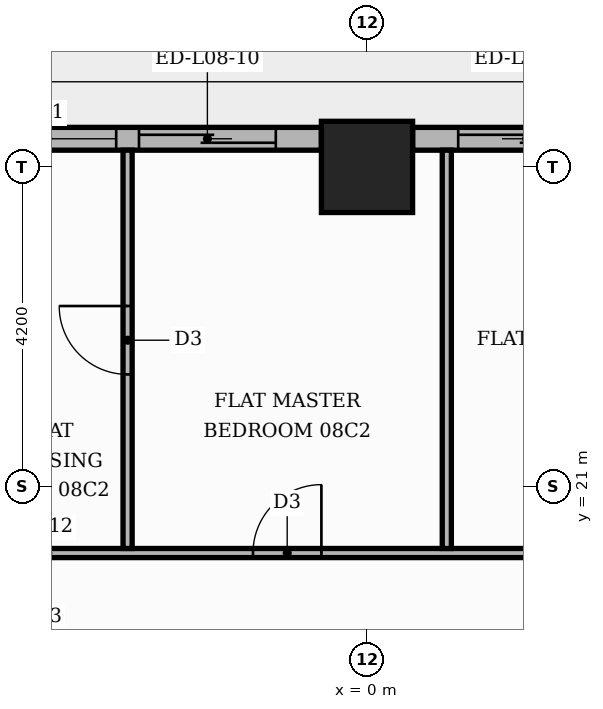
"""IFC4 building model, lengths in metres.
Left out: names, types, materials, properties, quantities, classifications, styles, units other than length and angle.
Written with IfcOpenShell. Run it as: python <this file> out.ifc"""

import sys

from ifc_helpers import new_model, si_unit, direction, frame, frame_2d, origin, origin_2d, place, context, subcontext, project, spatial, rectangle, extrude, element, fill, save


model = new_model("IFC4")
c1 = context("Model", 3, precision=1e-05, world=origin(), true_north=direction((0.0, 1.0)))
c2 = subcontext(c1, "Body", "Model", "MODEL_VIEW")
j1 = project(units=[si_unit("LENGTHUNIT", "METRE"), si_unit("PLANEANGLEUNIT", "RADIAN")], contexts=[c1])
p1 = place(None, origin())
s1 = spatial("IfcSite", under=j1, at=p1, CompositionType="ELEMENT")
p2 = place(p1, origin())
s2 = spatial("IfcBuilding", under=s1, at=p2, CompositionType="ELEMENT")
p3 = place(p2, frame((0.0, 0.0, 38.7)))
s3 = spatial("IfcBuildingStorey", under=s2, at=p3, CompositionType="ELEMENT", Elevation=38.7)
p4 = place(p3, frame((0.0, 25.2, 0.0), z_axis=(0.0, 0.0, 1.0), x_axis=(1.0, 0.0, 0.0)))
e1 = element("IfcColumn", 1, at=p4, inside=s3, PredefinedType="COLUMN", context=c2, shape_type="SweptSolid", body=[
    extrude(rectangle(XDim=1.2, YDim=1.2, at=origin_2d()), origin(), (0.0, 0.0, 1.0), 3.9),
])
p5 = place(p3, frame((7.8, 25.57, 0.0), z_axis=(0.0, 0.0, 1.0), x_axis=(-1.0, 0.0, 0.0)))
e2 = element("IfcWall", 2, at=p5, inside=s3, PredefinedType="STANDARD", context=c2, shape_type="SweptSolid", body=[
    extrude(rectangle(XDim=7.2, YDim=0.3, at=frame_2d((3.6, 0.0))), origin(), (0.0, 0.0, 1.0), 3.48),
])
p6 = place(p5, frame((0.6, 0.0, 0.9)))
e3 = element("IfcOpeningElement", 3, at=p6, cuts=e2, PredefinedType="OPENING", context=c2, shape_type="SweptSolid", body=[
    extrude(rectangle(XDim=1.8, YDim=2.1, at=frame_2d((0.9, 1.05))), frame((0.0, 0.16, 0.0), z_axis=(0.0, -1.0, 0.0), x_axis=(1.0, 0.0, 0.0)), (0.0, 0.0, 1.0), 0.32),
])
p7 = place(p5, frame((2.7, 0.0, 0.9)))
e4 = element("IfcOpeningElement", 4, at=p7, cuts=e2, PredefinedType="OPENING", context=c2, shape_type="SweptSolid", body=[
    extrude(rectangle(XDim=1.8, YDim=2.1, at=frame_2d((0.9, 1.05))), frame((0.0, 0.16, 0.0), z_axis=(0.0, -1.0, 0.0), x_axis=(1.0, 0.0, 0.0)), (0.0, 0.0, 1.0), 0.32),
])
p8 = place(p5, frame((4.8, 0.0, 0.0)))
e5 = element("IfcOpeningElement", 5, at=p8, cuts=e2, PredefinedType="OPENING", context=c2, shape_type="SweptSolid", body=[
    extrude(rectangle(XDim=1.8, YDim=2.4, at=frame_2d((0.9, 1.2))), frame((0.0, 0.16, 0.0), z_axis=(0.0, -1.0, 0.0), x_axis=(1.0, 0.0, 0.0)), (0.0, 0.0, 1.0), 0.32),
])
p9 = place(p3, frame((-0.6, 25.57, 0.0), z_axis=(0.0, 0.0, 1.0), x_axis=(-1.0, 0.0, 0.0)))
e6 = element("IfcWall", 6, at=p9, inside=s3, PredefinedType="STANDARD", context=c2, shape_type="SweptSolid", body=[
    extrude(rectangle(XDim=7.2, YDim=0.3, at=frame_2d((3.6, 0.0))), origin(), (0.0, 0.0, 1.0), 3.48),
])
p10 = place(p9, frame((0.6, 0.0, 0.0)))
e7 = element("IfcOpeningElement", 7, at=p10, cuts=e6, PredefinedType="OPENING", context=c2, shape_type="SweptSolid", body=[
    extrude(rectangle(XDim=1.8, YDim=2.4, at=frame_2d((0.9, 1.2))), frame((0.0, 0.16, 0.0), z_axis=(0.0, -1.0, 0.0), x_axis=(1.0, 0.0, 0.0)), (0.0, 0.0, 1.0), 0.32),
])
p11 = place(p9, frame((2.7, 0.0, 0.9)))
e8 = element("IfcOpeningElement", 8, at=p11, cuts=e6, PredefinedType="OPENING", context=c2, shape_type="SweptSolid", body=[
    extrude(rectangle(XDim=1.8, YDim=2.1, at=frame_2d((0.9, 1.05))), frame((0.0, 0.16, 0.0), z_axis=(0.0, -1.0, 0.0), x_axis=(1.0, 0.0, 0.0)), (0.0, 0.0, 1.0), 0.32),
])
p12 = place(p9, frame((4.8, 0.0, 0.9)))
e9 = element("IfcOpeningElement", 9, at=p12, cuts=e6, PredefinedType="OPENING", context=c2, shape_type="SweptSolid", body=[
    extrude(rectangle(XDim=1.8, YDim=2.1, at=frame_2d((0.9, 1.05))), frame((0.0, 0.16, 0.0), z_axis=(0.0, -1.0, 0.0), x_axis=(1.0, 0.0, 0.0)), (0.0, 0.0, 1.0), 0.32),
])
p13 = place(p3, frame((-13.55, 20.12, 0.0), z_axis=(0.0, 0.0, 1.0), x_axis=(1.0, 0.0, 0.0)))
e10 = element("IfcWall", 10, at=p13, inside=s3, PredefinedType="PARTITIONING", context=c2, shape_type="SweptSolid", body=[
    extrude(rectangle(XDim=18.7, YDim=0.12, at=frame_2d((9.35, 0.0))), origin(), (0.0, 0.0, 1.0), 3.48),
])
p14 = place(p13, frame((16.2, 0.0, 0.0)))
e11 = element("IfcOpeningElement", 11, at=p14, cuts=e10, PredefinedType="OPENING", context=c2, shape_type="SweptSolid", body=[
    extrude(rectangle(XDim=1.0, YDim=2.1, at=frame_2d((0.5, 1.05))), frame((0.0, 0.07, 0.0), z_axis=(0.0, -1.0, 0.0), x_axis=(1.0, 0.0, 0.0)), (0.0, 0.0, 1.0), 0.14),
])
p15 = place(p13, frame((12.05, 0.0, 0.0)))
e12 = element("IfcOpeningElement", 12, at=p15, cuts=e10, PredefinedType="OPENING", context=c2, shape_type="SweptSolid", body=[
    extrude(rectangle(XDim=0.9, YDim=2.1, at=frame_2d((0.45, 1.05))), frame((0.0, 0.07, 0.0), z_axis=(0.0, -1.0, 0.0), x_axis=(1.0, 0.0, 0.0)), (0.0, 0.0, 1.0), 0.14),
])
p16 = place(p13, frame((3.65, 0.0, 0.0)))
e13 = element("IfcOpeningElement", 13, at=p16, cuts=e10, PredefinedType="OPENING", context=c2, shape_type="SweptSolid", body=[
    extrude(rectangle(XDim=0.9, YDim=2.1, at=frame_2d((0.45, 1.05))), frame((0.0, 0.07, 0.0), z_axis=(0.0, -1.0, 0.0), x_axis=(1.0, 0.0, 0.0)), (0.0, 0.0, 1.0), 0.14),
])
p17 = place(p3, frame((-3.15, 20.18, 0.0), z_axis=(0.0, 0.0, 1.0), x_axis=(0.0, 1.0, 0.0)))
e14 = element("IfcWall", 14, at=p17, inside=s3, PredefinedType="PARTITIONING", context=c2, shape_type="SweptSolid", body=[
    extrude(rectangle(XDim=5.24, YDim=0.12, at=frame_2d((2.62, 0.0))), origin(), (0.0, 0.0, 1.0), 3.48),
])
p18 = place(p17, frame((2.29, 0.0, 0.0)))
e15 = element("IfcOpeningElement", 15, at=p18, cuts=e14, PredefinedType="OPENING", context=c2, shape_type="SweptSolid", body=[
    extrude(rectangle(XDim=0.9, YDim=2.1, at=frame_2d((0.45, 1.05))), frame((0.0, 0.07, 0.0), z_axis=(0.0, -1.0, 0.0), x_axis=(1.0, 0.0, 0.0)), (0.0, 0.0, 1.0), 0.14),
])
p19 = place(p3, frame((1.05, 20.18, 0.0), z_axis=(0.0, 0.0, 1.0), x_axis=(0.0, 1.0, 0.0)))
e16 = element("IfcWall", 16, at=p19, inside=s3, PredefinedType="PARTITIONING", context=c2, shape_type="SweptSolid", body=[
    extrude(rectangle(XDim=5.24, YDim=0.12, at=frame_2d((2.62, 0.0))), origin(), (0.0, 0.0, 1.0), 3.48),
])
p20 = place(p8, origin())
e17 = element("IfcDoor", 17, at=p20, inside=s3, OperationType="SLIDING_TO_RIGHT", PredefinedType="DOOR", context=c2, shape_type="SweptSolid", body=[
    extrude(rectangle(XDim=1.8, YDim=2.4, at=frame_2d((0.9, 1.2))), frame((0.0, 0.025, 0.0), z_axis=(0.0, -1.0, 0.0), x_axis=(1.0, 0.0, 0.0)), (0.0, 0.0, 1.0), 0.05),
])
fill(e5, e17)
p21 = place(p10, origin())
e18 = element("IfcDoor", 18, at=p21, inside=s3, OperationType="SLIDING_TO_LEFT", PredefinedType="DOOR", context=c2, shape_type="SweptSolid", body=[
    extrude(rectangle(XDim=1.8, YDim=2.4, at=frame_2d((0.9, 1.2))), frame((0.0, 0.025, 0.0), z_axis=(0.0, -1.0, 0.0), x_axis=(1.0, 0.0, 0.0)), (0.0, 0.0, 1.0), 0.05),
])
fill(e7, e18)
p22 = place(p11, origin())
e19 = element("IfcWindow", 19, at=p22, inside=s3, PartitioningType="SINGLE_PANEL", PredefinedType="WINDOW", context=c2, shape_type="SweptSolid", body=[
    extrude(rectangle(XDim=1.8, YDim=2.1, at=frame_2d((0.9, 1.05))), frame((0.0, 0.03, 0.0), z_axis=(0.0, -1.0, 0.0), x_axis=(1.0, 0.0, 0.0)), (0.0, 0.0, 1.0), 0.06),
])
fill(e8, e19)
p23 = place(p15, origin())
e20 = element("IfcDoor", 20, at=p23, inside=s3, OperationType="SINGLE_SWING_RIGHT", PredefinedType="DOOR", context=c2, shape_type="SweptSolid", body=[
    extrude(rectangle(XDim=0.9, YDim=2.1, at=frame_2d((0.45, 1.05))), frame((0.0, 0.025, 0.0), z_axis=(0.0, -1.0, 0.0), x_axis=(1.0, 0.0, 0.0)), (0.0, 0.0, 1.0), 0.05),
])
fill(e12, e20)
p24 = place(p18, origin())
e21 = element("IfcDoor", 21, at=p24, inside=s3, OperationType="SINGLE_SWING_RIGHT", PredefinedType="DOOR", context=c2, shape_type="SweptSolid", body=[
    extrude(rectangle(XDim=0.9, YDim=2.1, at=frame_2d((0.45, 1.05))), frame((0.0, 0.025, 0.0), z_axis=(0.0, -1.0, 0.0), x_axis=(1.0, 0.0, 0.0)), (0.0, 0.0, 1.0), 0.05),
])
fill(e15, e21)
save(model, sys.argv[1])
